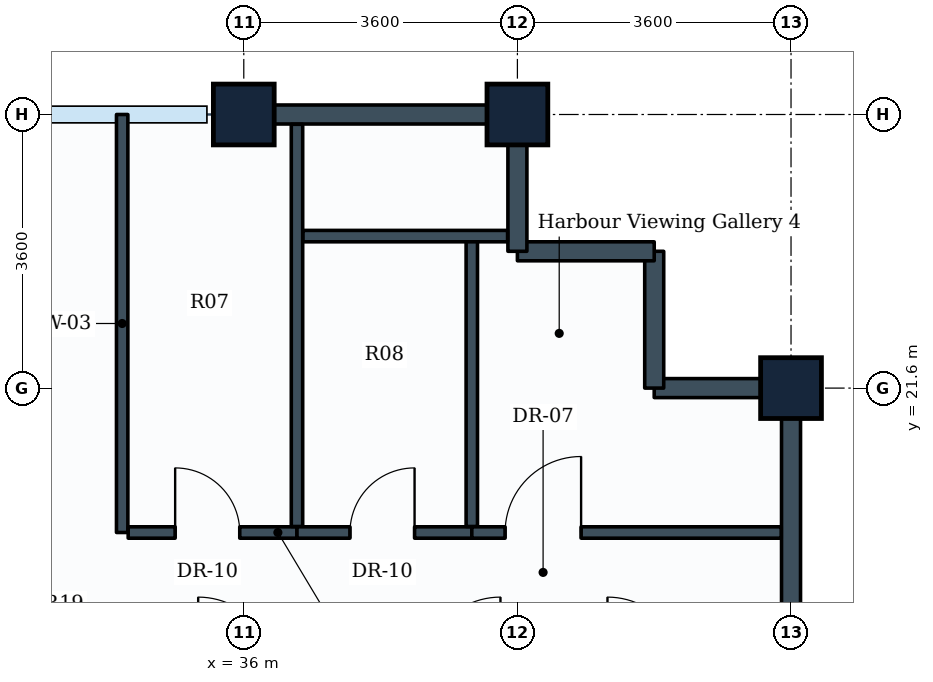
"""IFC4 building model, lengths in metres.
Left out: names, types, materials, properties, quantities, classifications, styles, units other than length and angle.
Written with IfcOpenShell. Run it as: python <this file> out.ifc"""

import sys

from ifc_helpers import new_model, si_unit, direction, frame, frame_2d, origin, origin_2d, place, context, subcontext, project, spatial, rectangle, extrude, element, fill, save


model = new_model("IFC4")
c1 = context("Model", 3, precision=1e-05, world=origin(), true_north=direction((0.0, 1.0)))
c2 = subcontext(c1, "Body", "Model", "MODEL_VIEW")
j1 = project(units=[si_unit("LENGTHUNIT", "METRE"), si_unit("PLANEANGLEUNIT", "RADIAN")], contexts=[c1])
p1 = place(None, origin())
s1 = spatial("IfcSite", under=j1, at=p1, CompositionType="ELEMENT")
p2 = place(p1, origin())
s2 = spatial("IfcBuilding", under=s1, at=p2, CompositionType="ELEMENT")
p3 = place(p2, frame((0.0, 0.0, 291.8)))
s3 = spatial("IfcBuildingStorey", under=s2, at=p3, CompositionType="ELEMENT", Elevation=291.8)
for number, where, z_axis, x_axis in (
    (1, (36.0, 25.2, 0.0), (0.0, 0.0, 1.0), (1.0, 0.0, 0.0)),
    (2, (39.6, 25.2, 0.0), (0.0, 0.0, 1.0), (1.0, 0.0, 0.0)),
    (3, (43.2, 21.6, 0.0), (0.0, 0.0, 1.0), (0.0, 1.0, 0.0)),
):
    element("IfcColumn", number, at=place(p3, frame(where, z_axis=z_axis, x_axis=x_axis)), inside=s3, PredefinedType="COLUMN", context=c2, shape_type="SweptSolid", body=[
        extrude(rectangle(XDim=0.8, YDim=0.8, at=origin_2d()), origin(), (0.0, 0.0, 1.0), 3.6),
    ])
p4 = place(p3, frame((43.2, 21.6, 0.0), z_axis=(0.0, 0.0, 1.0), x_axis=(0.0, -1.0, 0.0)))
e4 = element("IfcWall", 4, at=p4, inside=s3, PredefinedType="STANDARD", context=c2, shape_type="SweptSolid", body=[
    extrude(rectangle(XDim=3.6, YDim=0.25, at=frame_2d((1.8, 0.0))), origin(), (0.0, 0.0, 1.0), 2.83),
])
p5 = place(p3, frame((41.4, 21.6, 0.0), z_axis=(0.0, 0.0, 1.0), x_axis=(1.0, 0.0, 0.0)))
e5 = element("IfcWall", 5, at=p5, inside=s3, PredefinedType="STANDARD", context=c2, shape_type="SweptSolid", body=[
    extrude(rectangle(XDim=1.8, YDim=0.25, at=frame_2d((0.9, 0.0))), origin(), (0.0, 0.0, 1.0), 2.83),
])
for number, where, z_axis, x_axis in (
    (6, (41.4, 23.4, 0.0), (0.0, 0.0, 1.0), (0.0, -1.0, 0.0)),
    (7, (39.6, 23.4, 0.0), (0.0, 0.0, 1.0), (1.0, 0.0, 0.0)),
):
    element("IfcWall", number, at=place(p3, frame(where, z_axis=z_axis, x_axis=x_axis)), inside=s3, PredefinedType="STANDARD", context=c2, shape_type="SweptSolid", body=[
        extrude(rectangle(XDim=1.8, YDim=0.25, at=frame_2d((0.9, 0.0))), origin(), (0.0, 0.0, 1.0), 3.335),
    ])
p6 = place(p3, frame((39.6, 25.2, 0.0), z_axis=(0.0, 0.0, 1.0), x_axis=(0.0, -1.0, 0.0)))
e8 = element("IfcWall", 8, at=p6, inside=s3, PredefinedType="STANDARD", context=c2, shape_type="SweptSolid", body=[
    extrude(rectangle(XDim=1.8, YDim=0.25, at=frame_2d((0.9, 0.0))), origin(), (0.0, 0.0, 1.0), 2.83),
])
p7 = place(p3, frame((36.0, 25.2, 0.0), z_axis=(0.0, 0.0, 1.0), x_axis=(1.0, 0.0, 0.0)))
e9 = element("IfcWall", 9, at=p7, inside=s3, PredefinedType="STANDARD", context=c2, shape_type="SweptSolid", body=[
    extrude(rectangle(XDim=3.6, YDim=0.25, at=frame_2d((1.8, 0.0))), origin(), (0.0, 0.0, 1.0), 2.83),
])
p8 = place(p3, frame((34.4, 19.7, 0.0), z_axis=(0.0, 0.0, 1.0), x_axis=(0.0, 1.0, 0.0)))
e10 = element("IfcWall", 10, at=p8, inside=s3, PredefinedType="PARTITIONING", context=c2, shape_type="SweptSolid", body=[
    extrude(rectangle(XDim=5.5, YDim=0.15, at=frame_2d((2.75, 0.0))), origin(), (0.0, 0.0, 1.0), 2.83),
])
p9 = place(p3, frame((34.479, 19.7, 0.0), z_axis=(0.0, 0.0, 1.0), x_axis=(1.0, 0.0, 0.0)))
e11 = element("IfcWall", 11, at=p9, inside=s3, PredefinedType="PARTITIONING", context=c2, shape_type="SweptSolid", body=[
    extrude(rectangle(XDim=2.221, YDim=0.15, at=frame_2d((1.11, 0.0))), origin(), (0.0, 0.0, 1.0), 3.02),
])
p10 = place(p9, frame((0.618, 0.0, 0.0)))
e12 = element("IfcOpeningElement", 12, at=p10, cuts=e11, PredefinedType="OPENING", context=c2, shape_type="SweptSolid", body=[
    extrude(rectangle(XDim=0.85, YDim=2.1, at=frame_2d((0.425, 1.05))), frame((0.0, 0.085, 0.0), z_axis=(0.0, -1.0, 0.0), x_axis=(1.0, 0.0, 0.0)), (0.0, 0.0, 1.0), 0.17),
])
p11 = place(p3, frame((36.7, 19.779, 0.0), z_axis=(0.0, 0.0, 1.0), x_axis=(0.0, 1.0, 0.0)))
e13 = element("IfcWall", 13, at=p11, inside=s3, PredefinedType="PARTITIONING", context=c2, shape_type="SweptSolid", body=[
    extrude(rectangle(XDim=5.292, YDim=0.15, at=frame_2d((2.646, 0.0))), origin(), (0.0, 0.0, 1.0), 2.83),
])
p12 = place(p3, frame((36.7, 19.7, 0.0), z_axis=(0.0, 0.0, 1.0), x_axis=(1.0, 0.0, 0.0)))
e14 = element("IfcWall", 14, at=p12, inside=s3, PredefinedType="PARTITIONING", context=c2, shape_type="SweptSolid", body=[
    extrude(rectangle(XDim=2.3, YDim=0.15, at=frame_2d((1.15, 0.0))), origin(), (0.0, 0.0, 1.0), 3.335),
])
p13 = place(p12, frame((0.697, 0.0, 0.0)))
e15 = element("IfcOpeningElement", 15, at=p13, cuts=e14, PredefinedType="OPENING", context=c2, shape_type="SweptSolid", body=[
    extrude(rectangle(XDim=0.85, YDim=2.1, at=frame_2d((0.425, 1.05))), frame((0.0, 0.085, 0.0), z_axis=(0.0, -1.0, 0.0), x_axis=(1.0, 0.0, 0.0)), (0.0, 0.0, 1.0), 0.17),
])
p14 = place(p3, frame((39.0, 19.779, 0.0), z_axis=(0.0, 0.0, 1.0), x_axis=(0.0, 1.0, 0.0)))
e16 = element("IfcWall", 16, at=p14, inside=s3, PredefinedType="PARTITIONING", context=c2, shape_type="SweptSolid", body=[
    extrude(rectangle(XDim=3.821, YDim=0.15, at=frame_2d((1.911, 0.0))), origin(), (0.0, 0.0, 1.0), 3.335),
])
p15 = place(p3, frame((36.779, 23.6, 0.0), z_axis=(0.0, 0.0, 1.0), x_axis=(1.0, 0.0, 0.0)))
e17 = element("IfcWall", 17, at=p15, inside=s3, PredefinedType="PARTITIONING", context=c2, shape_type="SweptSolid", body=[
    extrude(rectangle(XDim=2.692, YDim=0.15, at=frame_2d((1.346, 0.0))), origin(), (0.0, 0.0, 1.0), 3.335),
])
p16 = place(p3, frame((39.0, 19.7, 0.0), z_axis=(0.0, 0.0, 1.0), x_axis=(1.0, 0.0, 0.0)))
e18 = element("IfcWall", 18, at=p16, inside=s3, PredefinedType="PARTITIONING", context=c2, shape_type="SweptSolid", body=[
    extrude(rectangle(XDim=4.071, YDim=0.15, at=frame_2d((2.036, 0.0))), origin(), (0.0, 0.0, 1.0), 2.83),
])
p17 = place(p16, frame((0.438, 0.0, 0.0)))
e19 = element("IfcOpeningElement", 19, at=p17, cuts=e18, PredefinedType="OPENING", context=c2, shape_type="SweptSolid", body=[
    extrude(rectangle(XDim=1.0, YDim=2.1, at=frame_2d((0.5, 1.05))), frame((0.0, 0.085, 0.0), z_axis=(0.0, -1.0, 0.0), x_axis=(1.0, 0.0, 0.0)), (0.0, 0.0, 1.0), 0.17),
])
p18 = place(p10, origin())
e20 = element("IfcDoor", 20, at=p18, inside=s3, OperationType="SINGLE_SWING_LEFT", PredefinedType="DOOR", context=c2, shape_type="SweptSolid", body=[
    extrude(rectangle(XDim=0.85, YDim=2.1, at=frame_2d((0.425, 1.05))), frame((0.0, 0.025, 0.0), z_axis=(0.0, -1.0, 0.0), x_axis=(1.0, 0.0, 0.0)), (0.0, 0.0, 1.0), 0.05),
])
fill(e12, e20)
p19 = place(p13, origin())
e21 = element("IfcDoor", 21, at=p19, inside=s3, OperationType="SINGLE_SWING_RIGHT", PredefinedType="DOOR", context=c2, shape_type="SweptSolid", body=[
    extrude(rectangle(XDim=0.85, YDim=2.1, at=frame_2d((0.425, 1.05))), frame((0.0, 0.025, 0.0), z_axis=(0.0, -1.0, 0.0), x_axis=(1.0, 0.0, 0.0)), (0.0, 0.0, 1.0), 0.05),
])
fill(e15, e21)
p20 = place(p17, origin())
e22 = element("IfcDoor", 22, at=p20, inside=s3, OperationType="SINGLE_SWING_RIGHT", PredefinedType="DOOR", context=c2, shape_type="SweptSolid", body=[
    extrude(rectangle(XDim=1.0, YDim=2.1, at=frame_2d((0.5, 1.05))), frame((0.0, 0.025, 0.0), z_axis=(0.0, -1.0, 0.0), x_axis=(1.0, 0.0, 0.0)), (0.0, 0.0, 1.0), 0.05),
])
fill(e19, e22)
save(model, sys.argv[1])
